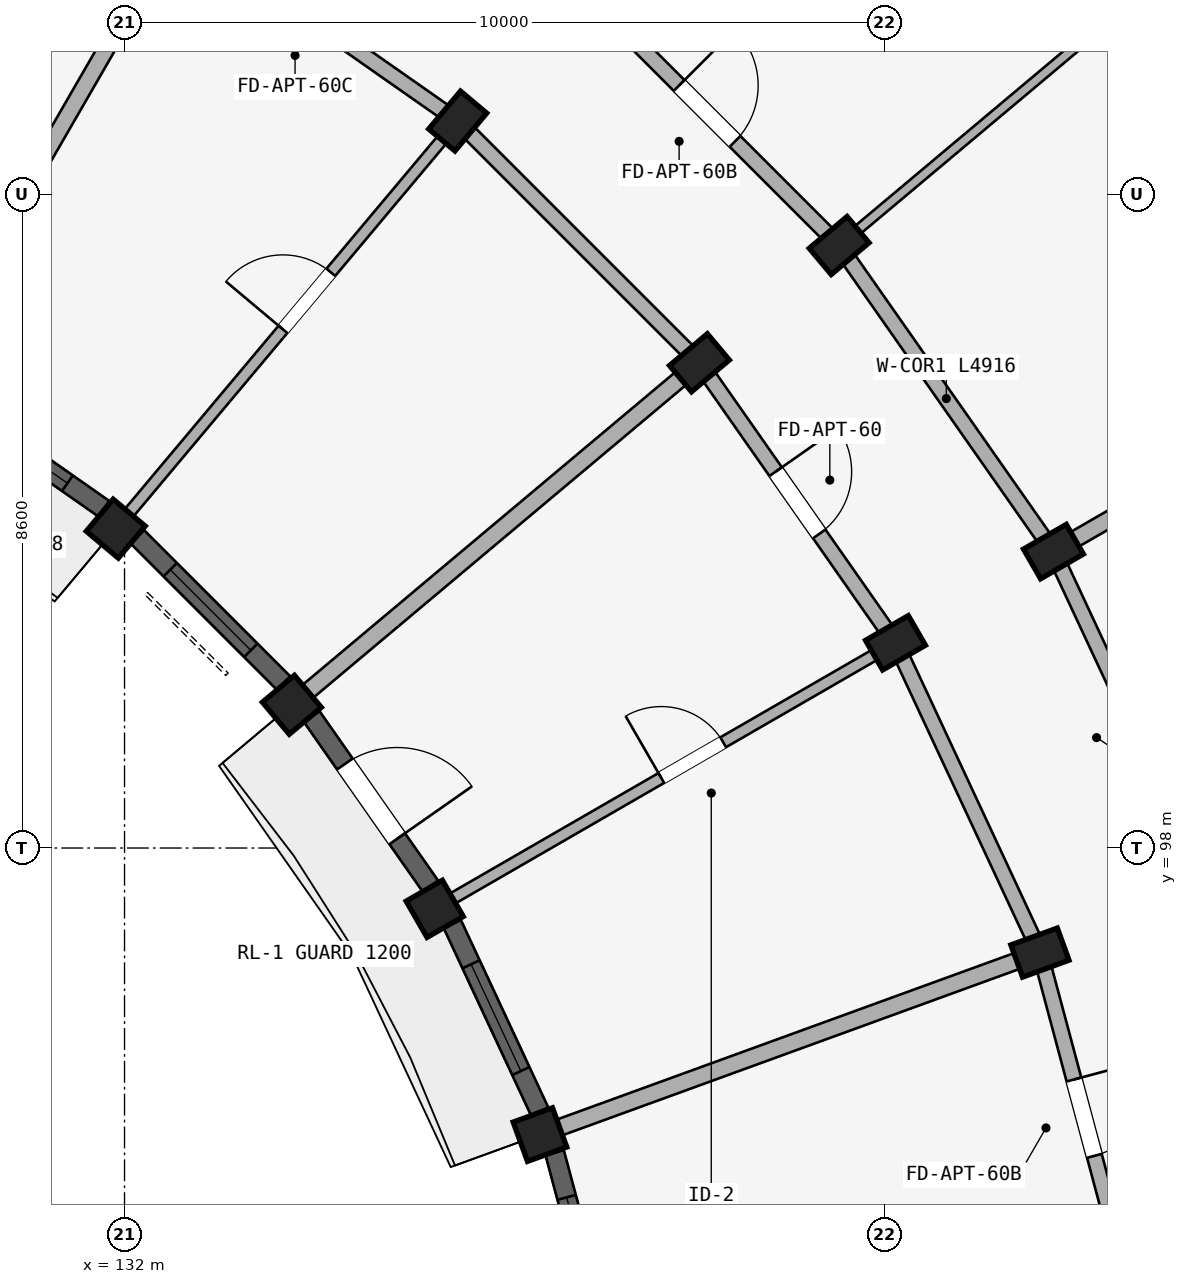
"""IFC4 building model, lengths in metres.
Left out: names, types, materials, properties, quantities, classifications, styles, units other than length and angle.
Written with IfcOpenShell. Run it as: python <this file> out.ifc"""

import sys

from ifc_helpers import new_model, si_unit, direction, frame, frame_2d, origin, origin_2d, place, context, subcontext, project, spatial, rectangle, extrude, element, fill, save


model = new_model("IFC4")
c1 = context("Model", 3, precision=1e-05, world=origin(), true_north=direction((0.0, 1.0)))
c2 = subcontext(c1, "Body", "Model", "MODEL_VIEW")
j1 = project(units=[si_unit("LENGTHUNIT", "METRE"), si_unit("PLANEANGLEUNIT", "RADIAN")], contexts=[c1])
p1 = place(None, origin())
s1 = spatial("IfcSite", under=j1, at=p1, CompositionType="ELEMENT")
p2 = place(p1, origin())
s2 = spatial("IfcBuilding", under=s1, at=p2, CompositionType="ELEMENT")
p3 = place(p2, frame((0.0, 0.0, 30.75)))
s3 = spatial("IfcBuildingStorey", under=s2, at=p3, CompositionType="ELEMENT", Elevation=30.75)
p4 = place(p3, frame((131.885, 102.202, 0.0), z_axis=(0.0, 0.0, 1.0), x_axis=(-0.766044443119, 0.642787609687, 0.0)))
e1 = element("IfcColumn", 1, at=p4, inside=s3, PredefinedType="COLUMN", context=c2, shape_type="SweptSolid", body=[
    extrude(rectangle(XDim=0.55, YDim=0.55, at=origin_2d()), origin(), (0.0, 0.0, 1.0), 2.93),
])
p5 = place(p3, frame((136.384, 107.564, 0.0), z_axis=(0.0, 0.0, 1.0), x_axis=(-0.766044443119, 0.642787609687, 0.0)))
e2 = element("IfcColumn", 2, at=p5, inside=s3, PredefinedType="COLUMN", context=c2, shape_type="SweptSolid", body=[
    extrude(rectangle(XDim=0.45, YDim=0.65, at=origin_2d()), origin(), (0.0, 0.0, 1.0), 2.93),
])
p6 = place(p3, frame((134.202, 99.885, 0.0), z_axis=(0.0, 0.0, 1.0), x_axis=(-0.642787609687, 0.766044443119, 0.0)))
e3 = element("IfcColumn", 3, at=p6, inside=s3, PredefinedType="COLUMN", context=c2, shape_type="SweptSolid", body=[
    extrude(rectangle(XDim=0.55, YDim=0.55, at=origin_2d()), origin(), (0.0, 0.0, 1.0), 2.93),
])
for number, where, z_axis, x_axis in (
    (4, (139.564, 104.384, 0.0), (0.0, 0.0, 1.0), (-0.643, 0.766, 0.0)),
    (5, (141.402, 105.927, 0.0), (0.0, 0.0, 1.0), (-0.643, 0.766, 0.0)),
):
    element("IfcColumn", number, at=place(p3, frame(where, z_axis=z_axis, x_axis=x_axis)), inside=s3, PredefinedType="COLUMN", context=c2, shape_type="SweptSolid", body=[
        extrude(rectangle(XDim=0.45, YDim=0.65, at=origin_2d()), origin(), (0.0, 0.0, 1.0), 2.93),
    ])
p7 = place(p3, frame((136.081, 97.2, 0.0), z_axis=(0.0, 0.0, 1.0), x_axis=(-0.5, 0.866025403784, 0.0)))
e6 = element("IfcColumn", 6, at=p7, inside=s3, PredefinedType="COLUMN", context=c2, shape_type="SweptSolid", body=[
    extrude(rectangle(XDim=0.55, YDim=0.55, at=origin_2d()), origin(), (0.0, 0.0, 1.0), 2.93),
])
for number, where, z_axis, x_axis in (
    (7, (142.144, 100.7, 0.0), (0.0, 0.0, 1.0), (-0.5, 0.866, 0.0)),
    (8, (144.222, 101.9, 0.0), (0.0, 0.0, 1.0), (-0.5, 0.866, 0.0)),
):
    element("IfcColumn", number, at=place(p3, frame(where, z_axis=z_axis, x_axis=x_axis)), inside=s3, PredefinedType="COLUMN", context=c2, shape_type="SweptSolid", body=[
        extrude(rectangle(XDim=0.45, YDim=0.65, at=origin_2d()), origin(), (0.0, 0.0, 1.0), 2.93),
    ])
p8 = place(p3, frame((137.466, 94.23, 0.0), z_axis=(0.0, 0.0, 1.0), x_axis=(-0.342020143326, 0.939692620786, 0.0)))
e9 = element("IfcColumn", 9, at=p8, inside=s3, PredefinedType="COLUMN", context=c2, shape_type="SweptSolid", body=[
    extrude(rectangle(XDim=0.55, YDim=0.55, at=origin_2d()), origin(), (0.0, 0.0, 1.0), 2.93),
])
p9 = place(p3, frame((144.044, 96.624, 0.0), z_axis=(0.0, 0.0, 1.0), x_axis=(-0.342020143326, 0.939692620786, 0.0)))
e10 = element("IfcColumn", 10, at=p9, inside=s3, PredefinedType="COLUMN", context=c2, shape_type="SweptSolid", body=[
    extrude(rectangle(XDim=0.45, YDim=0.65, at=origin_2d()), origin(), (0.0, 0.0, 1.0), 2.93),
])
p10 = place(p3, frame((132.7, 110.144, 0.0), z_axis=(0.0, 0.0, 1.0), x_axis=(0.819155404658, -0.573571637217, 0.0)))
e11 = element("IfcWall", 11, at=p10, inside=s3, PredefinedType="STANDARD", context=c2, shape_type="SweptSolid", body=[
    extrude(rectangle(XDim=4.497, YDim=0.2, at=frame_2d((2.249, 0.0))), origin(), (0.0, 0.0, 1.0), 2.372),
])
p11 = place(p10, frame((1.709, 0.0, 0.0)))
e12 = element("IfcOpeningElement", 12, at=p11, cuts=e11, PredefinedType="OPENING", context=c2, shape_type="SweptSolid", body=[
    extrude(rectangle(XDim=1.08, YDim=2.15, at=frame_2d((0.54, 1.075))), frame((0.0, 0.11, 0.0), z_axis=(0.0, -1.0, 0.0), x_axis=(1.0, 0.0, 0.0)), (0.0, 0.0, 1.0), 0.22),
])
p12 = place(p3, frame((136.384, 107.564, 0.0), z_axis=(0.0, 0.0, 1.0), x_axis=(0.707106781187, -0.707106781187, 0.0)))
e13 = element("IfcWall", 13, at=p12, inside=s3, PredefinedType="STANDARD", context=c2, shape_type="SweptSolid", body=[
    extrude(rectangle(XDim=4.497, YDim=0.2, at=frame_2d((2.249, 0.0))), origin(), (0.0, 0.0, 1.0), 2.372),
])
p13 = place(p3, frame((137.927, 109.402, 0.0), z_axis=(0.0, 0.0, 1.0), x_axis=(0.707106781187, -0.707106781187, 0.0)))
e14 = element("IfcWall", 14, at=p13, inside=s3, PredefinedType="STANDARD", context=c2, shape_type="SweptSolid", body=[
    extrude(rectangle(XDim=4.916, YDim=0.2, at=frame_2d((2.458, 0.0))), origin(), (0.0, 0.0, 1.0), 2.372),
])
p14 = place(p13, frame((1.938, 0.0, 0.0)))
e15 = element("IfcOpeningElement", 15, at=p14, cuts=e14, PredefinedType="OPENING", context=c2, shape_type="SweptSolid", body=[
    extrude(rectangle(XDim=1.04, YDim=2.15, at=frame_2d((0.52, 1.075))), frame((0.0, 0.11, 0.0), z_axis=(0.0, -1.0, 0.0), x_axis=(1.0, 0.0, 0.0)), (0.0, 0.0, 1.0), 0.22),
])
p15 = place(p3, frame((139.564, 104.384, 0.0), z_axis=(0.0, 0.0, 1.0), x_axis=(0.573571637217, -0.819155404658, 0.0)))
e16 = element("IfcWall", 16, at=p15, inside=s3, PredefinedType="STANDARD", context=c2, shape_type="SweptSolid", body=[
    extrude(rectangle(XDim=4.497, YDim=0.2, at=frame_2d((2.249, 0.0))), origin(), (0.0, 0.0, 1.0), 2.372),
])
p16 = place(p15, frame((1.749, 0.0, 0.0)))
e17 = element("IfcOpeningElement", 17, at=p16, cuts=e16, PredefinedType="OPENING", context=c2, shape_type="SweptSolid", body=[
    extrude(rectangle(XDim=1.0, YDim=2.15, at=frame_2d((0.5, 1.075))), frame((0.0, 0.11, 0.0), z_axis=(0.0, -1.0, 0.0), x_axis=(1.0, 0.0, 0.0)), (0.0, 0.0, 1.0), 0.22),
])
p17 = place(p3, frame((141.402, 105.927, 0.0), z_axis=(0.0, 0.0, 1.0), x_axis=(0.573592335331, -0.819140911474, 0.0)))
e18 = element("IfcWall", 18, at=p17, inside=s3, PredefinedType="STANDARD", context=c2, shape_type="SweptSolid", body=[
    extrude(rectangle(XDim=4.916, YDim=0.2, at=frame_2d((2.458, 0.0))), origin(), (0.0, 0.0, 1.0), 2.372),
])
p18 = place(p3, frame((142.144, 100.7, 0.0), z_axis=(0.0, 0.0, 1.0), x_axis=(0.422617978463, -0.906307919131, 0.0)))
e19 = element("IfcWall", 19, at=p18, inside=s3, PredefinedType="STANDARD", context=c2, shape_type="SweptSolid", body=[
    extrude(rectangle(XDim=4.497, YDim=0.2, at=frame_2d((2.249, 0.0))), origin(), (0.0, 0.0, 1.0), 2.372),
])
p19 = place(p3, frame((144.222, 101.9, 0.0), z_axis=(0.0, 0.0, 1.0), x_axis=(0.422629854778, -0.906302381024, 0.0)))
e20 = element("IfcWall", 20, at=p19, inside=s3, PredefinedType="STANDARD", context=c2, shape_type="SweptSolid", body=[
    extrude(rectangle(XDim=4.915, YDim=0.2, at=frame_2d((2.458, 0.0))), origin(), (0.0, 0.0, 1.0), 2.372),
])
p20 = place(p19, frame((1.918, 0.0, 0.0)))
e21 = element("IfcOpeningElement", 21, at=p20, cuts=e20, PredefinedType="OPENING", context=c2, shape_type="SweptSolid", body=[
    extrude(rectangle(XDim=1.08, YDim=2.15, at=frame_2d((0.54, 1.075))), frame((0.0, 0.11, 0.0), z_axis=(0.0, -1.0, 0.0), x_axis=(1.0, 0.0, 0.0)), (0.0, 0.0, 1.0), 0.22),
])
p21 = place(p3, frame((144.044, 96.624, 0.0), z_axis=(0.0, 0.0, 1.0), x_axis=(0.258787642463, -0.965934240054, 0.0)))
e22 = element("IfcWall", 22, at=p21, inside=s3, PredefinedType="STANDARD", context=c2, shape_type="SweptSolid", body=[
    extrude(rectangle(XDim=4.497, YDim=0.2, at=frame_2d((2.249, 0.0))), origin(), (0.0, 0.0, 1.0), 2.372),
])
p22 = place(p21, frame((1.729, 0.0, 0.0)))
e23 = element("IfcOpeningElement", 23, at=p22, cuts=e22, PredefinedType="OPENING", context=c2, shape_type="SweptSolid", body=[
    extrude(rectangle(XDim=1.04, YDim=2.15, at=frame_2d((0.52, 1.075))), frame((0.0, 0.11, 0.0), z_axis=(0.0, -1.0, 0.0), x_axis=(1.0, 0.0, 0.0)), (0.0, 0.0, 1.0), 0.22),
])
p23 = place(p3, frame((129.3, 104.254, 0.0), z_axis=(0.0, 0.0, 1.0), x_axis=(0.499997969693, 0.866026575979, 0.0)))
e24 = element("IfcWall", 24, at=p23, inside=s3, PredefinedType="STANDARD", context=c2, shape_type="SweptSolid", body=[
    extrude(rectangle(XDim=6.75, YDim=0.22, at=frame_2d((3.375, 0.0))), origin(), (0.0, 0.0, 1.0), 2.372),
])
p24 = place(p3, frame((132.013, 102.355, 0.0), z_axis=(0.0, 0.0, 1.0), x_axis=(0.642784846501, 0.766046761698, 0.0)))
e25 = element("IfcWall", 25, at=p24, inside=s3, PredefinedType="PARTITIONING", context=c2, shape_type="SweptSolid", body=[
    extrude(rectangle(XDim=6.75, YDim=0.15, at=frame_2d((3.375, 0.0))), origin(), (0.0, 0.0, 1.0), 2.372),
])
p25 = place(p24, frame((3.222, 0.0, 0.0)))
e26 = element("IfcOpeningElement", 26, at=p25, cuts=e25, PredefinedType="OPENING", context=c2, shape_type="SweptSolid", body=[
    extrude(rectangle(XDim=0.98, YDim=2.12, at=frame_2d((0.49, 1.06))), frame((0.0, 0.085, 0.0), z_axis=(0.0, -1.0, 0.0), x_axis=(1.0, 0.0, 0.0)), (0.0, 0.0, 1.0), 0.17),
])
p26 = place(p3, frame((134.355, 100.013, 0.0), z_axis=(0.0, 0.0, 1.0), x_axis=(0.766046761698, 0.642784846501, 0.0)))
e27 = element("IfcWall", 27, at=p26, inside=s3, PredefinedType="STANDARD", context=c2, shape_type="SweptSolid", body=[
    extrude(rectangle(XDim=6.75, YDim=0.22, at=frame_2d((3.375, 0.0))), origin(), (0.0, 0.0, 1.0), 2.372),
])
p27 = place(p3, frame((141.479, 105.991, 0.0), z_axis=(0.0, 0.0, 1.0), x_axis=(0.76605148563, 0.642779216656, 0.0)))
e28 = element("IfcWall", 28, at=p27, inside=s3, PredefinedType="PARTITIONING", context=c2, shape_type="SweptSolid", body=[
    extrude(rectangle(XDim=14.62, YDim=0.125, at=frame_2d((7.31, 0.0))), origin(), (0.0, 0.0, 1.0), 2.372),
])
p28 = place(p27, frame((4.449, 0.0, 0.0)))
e29 = element("IfcOpeningElement", 29, at=p28, cuts=e28, PredefinedType="OPENING", context=c2, shape_type="SweptSolid", body=[
    extrude(rectangle(XDim=0.8, YDim=2.1, at=frame_2d((0.4, 1.05))), frame((0.0, 0.073, 0.0), z_axis=(0.0, -1.0, 0.0), x_axis=(1.0, 0.0, 0.0)), (0.0, 0.0, 1.0), 0.145),
])
p29 = place(p3, frame((136.254, 97.3, 0.0), z_axis=(0.0, 0.0, 1.0), x_axis=(0.866026575979, 0.499997969693, 0.0)))
e30 = element("IfcWall", 30, at=p29, inside=s3, PredefinedType="PARTITIONING", context=c2, shape_type="SweptSolid", body=[
    extrude(rectangle(XDim=6.75, YDim=0.15, at=frame_2d((3.375, 0.0))), origin(), (0.0, 0.0, 1.0), 2.372),
])
p30 = place(p29, frame((3.242, 0.0, 0.0)))
e31 = element("IfcOpeningElement", 31, at=p30, cuts=e30, PredefinedType="OPENING", context=c2, shape_type="SweptSolid", body=[
    extrude(rectangle(XDim=0.94, YDim=2.1, at=frame_2d((0.47, 1.05))), frame((0.0, 0.085, 0.0), z_axis=(0.0, -1.0, 0.0), x_axis=(1.0, 0.0, 0.0)), (0.0, 0.0, 1.0), 0.17),
])
p31 = place(p3, frame((144.309, 101.95, 0.0), z_axis=(0.0, 0.0, 1.0), x_axis=(0.866020956416, 0.500007702989, 0.0)))
e32 = element("IfcWall", 32, at=p31, inside=s3, PredefinedType="STANDARD", context=c2, shape_type="SweptSolid", body=[
    extrude(rectangle(XDim=14.62, YDim=0.22, at=frame_2d((7.31, 0.0))), origin(), (0.0, 0.0, 1.0), 2.372),
])
p32 = place(p3, frame((137.654, 94.298, 0.0), z_axis=(0.0, 0.0, 1.0), x_axis=(0.939696231917, 0.342010221662, 0.0)))
e33 = element("IfcWall", 33, at=p32, inside=s3, PredefinedType="STANDARD", context=c2, shape_type="SweptSolid", body=[
    extrude(rectangle(XDim=6.75, YDim=0.22, at=frame_2d((3.375, 0.0))), origin(), (0.0, 0.0, 1.0), 2.372),
])
p33 = place(p3, frame((129.5, 104.024, 0.0), z_axis=(0.0, 0.0, 1.0), x_axis=(0.819126475299, -0.573612950921, 0.0)))
e34 = element("IfcWall", 34, at=p33, inside=s3, PredefinedType="STANDARD", context=c2, shape_type="SweptSolid", body=[
    extrude(rectangle(XDim=2.72, YDim=0.25, at=frame_2d((1.36, 0.0))), origin(), (0.0, 0.0, 1.0), 2.422),
])
p34 = place(p33, frame((0.585, 0.0, 0.622)))
e35 = element("IfcOpeningElement", 35, at=p34, cuts=e34, PredefinedType="OPENING", context=c2, shape_type="SweptSolid", body=[
    extrude(rectangle(XDim=1.55, YDim=1.6, at=frame_2d((0.775, 0.8))), frame((0.0, 0.135, 0.0), z_axis=(0.0, -1.0, 0.0), x_axis=(1.0, 0.0, 0.0)), (0.0, 0.0, 1.0), 0.27),
])
p35 = place(p3, frame((132.17, 102.093, 0.0), z_axis=(0.0, 0.0, 1.0), x_axis=(0.707106781187, -0.707106781187, 0.0)))
e36 = element("IfcWall", 36, at=p35, inside=s3, PredefinedType="STANDARD", context=c2, shape_type="SweptSolid", body=[
    extrude(rectangle(XDim=2.72, YDim=0.25, at=frame_2d((1.36, 0.0))), origin(), (0.0, 0.0, 1.0), 2.422),
])
p36 = place(p35, frame((0.61, 0.0, 0.572)))
e37 = element("IfcOpeningElement", 37, at=p36, cuts=e36, PredefinedType="OPENING", context=c2, shape_type="SweptSolid", body=[
    extrude(rectangle(XDim=1.5, YDim=1.65, at=frame_2d((0.75, 0.825))), frame((0.0, 0.135, 0.0), z_axis=(0.0, -1.0, 0.0), x_axis=(1.0, 0.0, 0.0)), (0.0, 0.0, 1.0), 0.27),
])
p37 = place(p3, frame((134.464, 99.728, 0.0), z_axis=(0.0, 0.0, 1.0), x_axis=(0.573612950921, -0.819126475299, 0.0)))
e38 = element("IfcWall", 38, at=p37, inside=s3, PredefinedType="STANDARD", context=c2, shape_type="SweptSolid", body=[
    extrude(rectangle(XDim=2.72, YDim=0.25, at=frame_2d((1.36, 0.0))), origin(), (0.0, 0.0, 1.0), 2.422),
])
p38 = place(p37, frame((0.76, 0.0, 0.0)))
e39 = element("IfcOpeningElement", 39, at=p38, cuts=e38, PredefinedType="OPENING", context=c2, shape_type="SweptSolid", body=[
    extrude(rectangle(XDim=1.2, YDim=2.15, at=frame_2d((0.6, 1.075))), frame((0.0, 0.135, 0.0), z_axis=(0.0, -1.0, 0.0), x_axis=(1.0, 0.0, 0.0)), (0.0, 0.0, 1.0), 0.27),
])
p39 = place(p3, frame((136.312, 97.0, 0.0), z_axis=(0.0, 0.0, 1.0), x_axis=(0.422629903269, -0.906302358412, 0.0)))
e40 = element("IfcWall", 40, at=p39, inside=s3, PredefinedType="STANDARD", context=c2, shape_type="SweptSolid", body=[
    extrude(rectangle(XDim=2.72, YDim=0.25, at=frame_2d((1.36, 0.0))), origin(), (0.0, 0.0, 1.0), 2.422),
])
p40 = place(p39, frame((0.585, 0.0, 0.622)))
e41 = element("IfcOpeningElement", 41, at=p40, cuts=e40, PredefinedType="OPENING", context=c2, shape_type="SweptSolid", body=[
    extrude(rectangle(XDim=1.55, YDim=1.6, at=frame_2d((0.775, 0.8))), frame((0.0, 0.135, 0.0), z_axis=(0.0, -1.0, 0.0), x_axis=(1.0, 0.0, 0.0)), (0.0, 0.0, 1.0), 0.27),
])
p41 = place(p3, frame((137.659, 93.993, 0.0), z_axis=(0.0, 0.0, 1.0), x_axis=(0.258807879411, -0.965928818058, 0.0)))
e42 = element("IfcWall", 42, at=p41, inside=s3, PredefinedType="STANDARD", context=c2, shape_type="SweptSolid", body=[
    extrude(rectangle(XDim=2.72, YDim=0.25, at=frame_2d((1.36, 0.0))), origin(), (0.0, 0.0, 1.0), 2.422),
])
p42 = place(p41, frame((0.61, 0.0, 0.572)))
e43 = element("IfcOpeningElement", 43, at=p42, cuts=e42, PredefinedType="OPENING", context=c2, shape_type="SweptSolid", body=[
    extrude(rectangle(XDim=1.5, YDim=1.65, at=frame_2d((0.75, 0.825))), frame((0.0, 0.135, 0.0), z_axis=(0.0, -1.0, 0.0), x_axis=(1.0, 0.0, 0.0)), (0.0, 0.0, 1.0), 0.27),
])
p43 = place(p34, origin())
e44 = element("IfcWindow", 44, at=p43, inside=s3, PartitioningType="DOUBLE_PANEL_VERTICAL", PredefinedType="WINDOW", context=c2, shape_type="SweptSolid", body=[
    extrude(rectangle(XDim=1.55, YDim=1.6, at=frame_2d((0.775, 0.8))), frame((0.0, 0.03, 0.0), z_axis=(0.0, -1.0, 0.0), x_axis=(1.0, 0.0, 0.0)), (0.0, 0.0, 1.0), 0.06),
])
fill(e35, e44)
p44 = place(p36, origin())
e45 = element("IfcWindow", 45, at=p44, inside=s3, PartitioningType="DOUBLE_PANEL_VERTICAL", PredefinedType="WINDOW", context=c2, shape_type="SweptSolid", body=[
    extrude(rectangle(XDim=1.5, YDim=1.65, at=frame_2d((0.75, 0.825))), frame((0.0, 0.03, 0.0), z_axis=(0.0, -1.0, 0.0), x_axis=(1.0, 0.0, 0.0)), (0.0, 0.0, 1.0), 0.06),
])
fill(e37, e45)
p45 = place(p40, origin())
e46 = element("IfcWindow", 46, at=p45, inside=s3, PartitioningType="DOUBLE_PANEL_VERTICAL", PredefinedType="WINDOW", context=c2, shape_type="SweptSolid", body=[
    extrude(rectangle(XDim=1.55, YDim=1.6, at=frame_2d((0.775, 0.8))), frame((0.0, 0.03, 0.0), z_axis=(0.0, -1.0, 0.0), x_axis=(1.0, 0.0, 0.0)), (0.0, 0.0, 1.0), 0.06),
])
fill(e41, e46)
p46 = place(p42, origin())
e47 = element("IfcWindow", 47, at=p46, inside=s3, PartitioningType="DOUBLE_PANEL_VERTICAL", PredefinedType="WINDOW", context=c2, shape_type="SweptSolid", body=[
    extrude(rectangle(XDim=1.5, YDim=1.65, at=frame_2d((0.75, 0.825))), frame((0.0, 0.03, 0.0), z_axis=(0.0, -1.0, 0.0), x_axis=(1.0, 0.0, 0.0)), (0.0, 0.0, 1.0), 0.06),
])
fill(e43, e47)
p47 = place(p25, origin())
e48 = element("IfcDoor", 48, at=p47, inside=s3, OperationType="SINGLE_SWING_LEFT", PredefinedType="DOOR", context=c2, shape_type="SweptSolid", body=[
    extrude(rectangle(XDim=0.98, YDim=2.12, at=frame_2d((0.49, 1.06))), frame((0.0, 0.025, 0.0), z_axis=(0.0, -1.0, 0.0), x_axis=(1.0, 0.0, 0.0)), (0.0, 0.0, 1.0), 0.05),
])
fill(e26, e48)
p48 = place(p30, origin())
e49 = element("IfcDoor", 49, at=p48, inside=s3, OperationType="SINGLE_SWING_LEFT", PredefinedType="DOOR", context=c2, shape_type="SweptSolid", body=[
    extrude(rectangle(XDim=0.94, YDim=2.1, at=frame_2d((0.47, 1.05))), frame((0.0, 0.025, 0.0), z_axis=(0.0, -1.0, 0.0), x_axis=(1.0, 0.0, 0.0)), (0.0, 0.0, 1.0), 0.05),
])
fill(e31, e49)
p49 = place(p14, origin())
e50 = element("IfcDoor", 50, at=p49, inside=s3, OperationType="SINGLE_SWING_LEFT", PredefinedType="DOOR", context=c2, shape_type="SweptSolid", body=[
    extrude(rectangle(XDim=1.04, YDim=2.15, at=frame_2d((0.52, 1.075))), frame((0.0, 0.025, 0.0), z_axis=(0.0, -1.0, 0.0), x_axis=(1.0, 0.0, 0.0)), (0.0, 0.0, 1.0), 0.05),
])
fill(e15, e50)
p50 = place(p16, frame((1.0, 0.0, 0.0), z_axis=(0.0, 0.0, 1.0), x_axis=(-1.0, 0.0, 0.0)))
e51 = element("IfcDoor", 51, at=p50, inside=s3, OperationType="SINGLE_SWING_RIGHT", PredefinedType="DOOR", context=c2, shape_type="SweptSolid", body=[
    extrude(rectangle(XDim=1.0, YDim=2.15, at=frame_2d((0.5, 1.075))), frame((0.0, 0.025, 0.0), z_axis=(0.0, -1.0, 0.0), x_axis=(1.0, 0.0, 0.0)), (0.0, 0.0, 1.0), 0.05),
])
fill(e17, e51)
p51 = place(p22, origin())
e52 = element("IfcDoor", 52, at=p51, inside=s3, OperationType="SINGLE_SWING_LEFT", PredefinedType="DOOR", context=c2, shape_type="SweptSolid", body=[
    extrude(rectangle(XDim=1.04, YDim=2.15, at=frame_2d((0.52, 1.075))), frame((0.0, 0.025, 0.0), z_axis=(0.0, -1.0, 0.0), x_axis=(1.0, 0.0, 0.0)), (0.0, 0.0, 1.0), 0.05),
])
fill(e23, e52)
p52 = place(p38, frame((1.2, 0.0, 0.0), z_axis=(0.0, 0.0, 1.0), x_axis=(-1.0, 0.0, 0.0)))
e53 = element("IfcDoor", 53, at=p52, inside=s3, OperationType="SINGLE_SWING_LEFT", PredefinedType="DOOR", context=c2, shape_type="SweptSolid", body=[
    extrude(rectangle(XDim=1.2, YDim=2.15, at=frame_2d((0.6, 1.075))), frame((0.0, 0.025, 0.0), z_axis=(0.0, -1.0, 0.0), x_axis=(1.0, 0.0, 0.0)), (0.0, 0.0, 1.0), 0.05),
])
fill(e39, e53)
save(model, sys.argv[1])
